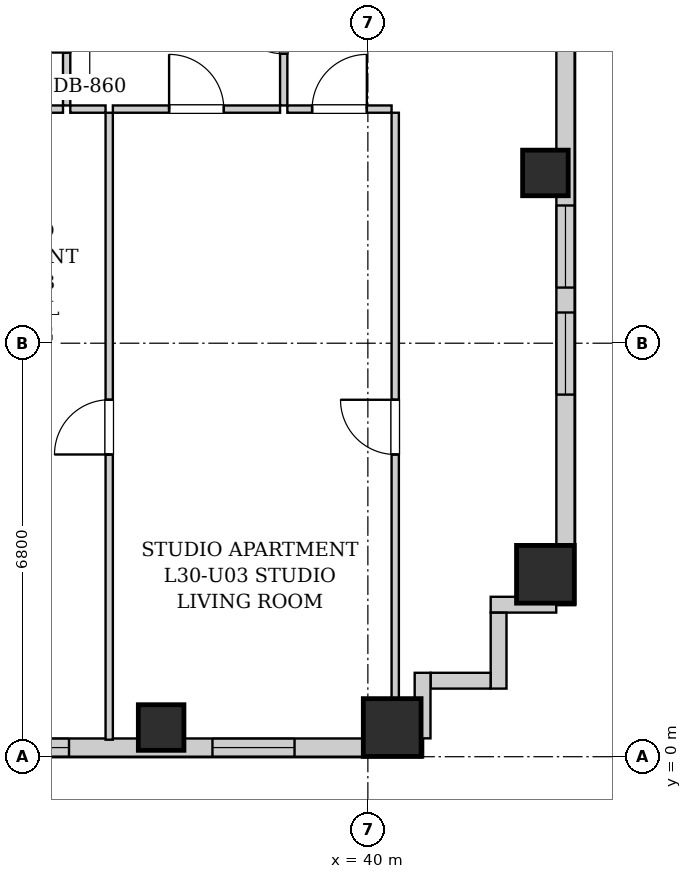
"""IFC4 building model, lengths in metres.
Left out: names, types, materials, properties, quantities, classifications, styles, units other than length and angle.
Written with IfcOpenShell. Run it as: python <this file> out.ifc"""

import sys

from ifc_helpers import new_model, si_unit, direction, frame, frame_2d, origin, origin_2d, place, context, subcontext, project, spatial, rectangle, extrude, element, fill, save


model = new_model("IFC4")
c1 = context("Model", 3, precision=1e-05, world=origin(), true_north=direction((0.0, 1.0)))
c2 = subcontext(c1, "Body", "Model", "MODEL_VIEW")
j1 = project(units=[si_unit("LENGTHUNIT", "METRE"), si_unit("PLANEANGLEUNIT", "RADIAN")], contexts=[c1])
p1 = place(None, origin())
s1 = spatial("IfcSite", under=j1, at=p1, CompositionType="ELEMENT")
p2 = place(p1, origin())
s2 = spatial("IfcBuilding", under=s1, at=p2, CompositionType="ELEMENT")
p3 = place(p2, frame((0.0, 0.0, 107.1)))
s3 = spatial("IfcBuildingStorey", under=s2, at=p3, CompositionType="ELEMENT", Elevation=107.1)
p4 = place(p3, frame((36.6, 0.48, 0.0), z_axis=(0.0, 0.0, 1.0), x_axis=(1.0, 0.0, 0.0)))
e1 = element("IfcColumn", 1, at=p4, inside=s3, PredefinedType="COLUMN", context=c2, shape_type="SweptSolid", body=[
    extrude(rectangle(XDim=0.75, YDim=0.75, at=origin_2d()), origin(), (0.0, 0.0, 1.0), 3.2),
])
for number, where, z_axis, x_axis in (
    (2, (40.4, 0.48, 0.0), (0.0, 0.0, 1.0), (1.0, 0.0, 0.0)),
    (3, (42.92, 3.0, 0.0), (0.0, 0.0, 1.0), (1.0, 0.0, 0.0)),
):
    element("IfcColumn", number, at=place(p3, frame(where, z_axis=z_axis, x_axis=x_axis)), inside=s3, PredefinedType="COLUMN", context=c2, shape_type="SweptSolid", body=[
        extrude(rectangle(XDim=0.95, YDim=0.95, at=origin_2d()), origin(), (0.0, 0.0, 1.0), 3.2),
    ])
p5 = place(p3, frame((42.92, 9.6, 0.0), z_axis=(0.0, 0.0, 1.0), x_axis=(1.0, 0.0, 0.0)))
e4 = element("IfcColumn", 4, at=p5, inside=s3, PredefinedType="COLUMN", context=c2, shape_type="SweptSolid", body=[
    extrude(rectangle(XDim=0.75, YDim=0.75, at=origin_2d()), origin(), (0.0, 0.0, 1.0), 3.2),
])
p6 = place(p3, frame((43.25, 40.8, 0.0), z_axis=(0.0, 0.0, 1.0), x_axis=(0.0, -1.0, 0.0)))
e5 = element("IfcWall", 5, at=p6, inside=s3, PredefinedType="SOLIDWALL", context=c2, shape_type="SweptSolid", body=[
    extrude(rectangle(XDim=38.3, YDim=0.3, at=frame_2d((19.15, 0.0))), origin(), (0.0, 0.0, 1.0), 2.94),
])
p7 = place(p6, frame((33.495, 0.0, 0.55)))
e6 = element("IfcOpeningElement", 6, at=p7, cuts=e5, PredefinedType="OPENING", context=c2, shape_type="SweptSolid", body=[
    extrude(rectangle(XDim=1.35, YDim=1.2, at=frame_2d((0.675, 0.6))), frame((0.0, 0.16, 0.0), z_axis=(0.0, -1.0, 0.0), x_axis=(1.0, 0.0, 0.0)), (0.0, 0.0, 1.0), 0.32),
])
p8 = place(p6, frame((31.735, 0.0, 0.55)))
e7 = element("IfcOpeningElement", 7, at=p8, cuts=e5, PredefinedType="OPENING", context=c2, shape_type="SweptSolid", body=[
    extrude(rectangle(XDim=1.35, YDim=1.2, at=frame_2d((0.675, 0.6))), frame((0.0, 0.16, 0.0), z_axis=(0.0, -1.0, 0.0), x_axis=(1.0, 0.0, 0.0)), (0.0, 0.0, 1.0), 0.32),
])
p9 = place(p6, frame((21.93, 0.0, 0.55)))
e8 = element("IfcOpeningElement", 8, at=p9, cuts=e5, PredefinedType="OPENING", context=c2, shape_type="SweptSolid", body=[
    extrude(rectangle(XDim=1.35, YDim=1.2, at=frame_2d((0.675, 0.6))), frame((0.0, 0.16, 0.0), z_axis=(0.0, -1.0, 0.0), x_axis=(1.0, 0.0, 0.0)), (0.0, 0.0, 1.0), 0.32),
])
p10 = place(p6, frame((23.54, 0.0, 0.55)))
e9 = element("IfcOpeningElement", 9, at=p10, cuts=e5, PredefinedType="OPENING", context=c2, shape_type="SweptSolid", body=[
    extrude(rectangle(XDim=1.35, YDim=1.2, at=frame_2d((0.675, 0.6))), frame((0.0, 0.16, 0.0), z_axis=(0.0, -1.0, 0.0), x_axis=(1.0, 0.0, 0.0)), (0.0, 0.0, 1.0), 0.32),
])
p11 = place(p6, frame((14.95, 0.0, 0.55)))
e10 = element("IfcOpeningElement", 10, at=p11, cuts=e5, PredefinedType="OPENING", context=c2, shape_type="SweptSolid", body=[
    extrude(rectangle(XDim=1.35, YDim=1.2, at=frame_2d((0.675, 0.6))), frame((0.0, 0.16, 0.0), z_axis=(0.0, -1.0, 0.0), x_axis=(1.0, 0.0, 0.0)), (0.0, 0.0, 1.0), 0.32),
])
p12 = place(p6, frame((12.335, 0.0, 0.55)))
e11 = element("IfcOpeningElement", 11, at=p12, cuts=e5, PredefinedType="OPENING", context=c2, shape_type="SweptSolid", body=[
    extrude(rectangle(XDim=1.35, YDim=1.2, at=frame_2d((0.675, 0.6))), frame((0.0, 0.16, 0.0), z_axis=(0.0, -1.0, 0.0), x_axis=(1.0, 0.0, 0.0)), (0.0, 0.0, 1.0), 0.32),
])
p13 = place(p3, frame((40.9, 0.15, 0.0), z_axis=(0.0, 0.0, 1.0), x_axis=(-1.0, 0.0, 0.0)))
e12 = element("IfcWall", 12, at=p13, inside=s3, PredefinedType="SOLIDWALL", context=c2, shape_type="SweptSolid", body=[
    extrude(rectangle(XDim=23.15, YDim=0.3, at=frame_2d((11.575, 0.0))), origin(), (0.0, 0.0, 1.0), 2.94),
])
p14 = place(p13, frame((20.296, 0.0, 0.55)))
e13 = element("IfcOpeningElement", 13, at=p14, cuts=e12, PredefinedType="OPENING", context=c2, shape_type="SweptSolid", body=[
    extrude(rectangle(XDim=1.35, YDim=1.2, at=frame_2d((0.675, 0.6))), frame((0.0, 0.16, 0.0), z_axis=(0.0, -1.0, 0.0), x_axis=(1.0, 0.0, 0.0)), (0.0, 0.0, 1.0), 0.32),
])
p15 = place(p13, frame((12.55, 0.0, 0.55)))
e14 = element("IfcOpeningElement", 14, at=p15, cuts=e12, PredefinedType="OPENING", context=c2, shape_type="SweptSolid", body=[
    extrude(rectangle(XDim=0.85, YDim=1.2, at=frame_2d((0.425, 0.6))), frame((0.0, 0.16, 0.0), z_axis=(0.0, -1.0, 0.0), x_axis=(1.0, 0.0, 0.0)), (0.0, 0.0, 1.0), 0.32),
])
p16 = place(p13, frame((9.622, 0.0, 0.55)))
e15 = element("IfcOpeningElement", 15, at=p16, cuts=e12, PredefinedType="OPENING", context=c2, shape_type="SweptSolid", body=[
    extrude(rectangle(XDim=1.35, YDim=1.2, at=frame_2d((0.675, 0.6))), frame((0.0, 0.16, 0.0), z_axis=(0.0, -1.0, 0.0), x_axis=(1.0, 0.0, 0.0)), (0.0, 0.0, 1.0), 0.32),
])
p17 = place(p13, frame((5.815, 0.0, 0.55)))
e16 = element("IfcOpeningElement", 16, at=p17, cuts=e12, PredefinedType="OPENING", context=c2, shape_type="SweptSolid", body=[
    extrude(rectangle(XDim=1.35, YDim=1.2, at=frame_2d((0.675, 0.6))), frame((0.0, 0.16, 0.0), z_axis=(0.0, -1.0, 0.0), x_axis=(1.0, 0.0, 0.0)), (0.0, 0.0, 1.0), 0.32),
])
p18 = place(p13, frame((2.106, 0.0, 0.55)))
e17 = element("IfcOpeningElement", 17, at=p18, cuts=e12, PredefinedType="OPENING", context=c2, shape_type="SweptSolid", body=[
    extrude(rectangle(XDim=1.35, YDim=1.2, at=frame_2d((0.675, 0.6))), frame((0.0, 0.16, 0.0), z_axis=(0.0, -1.0, 0.0), x_axis=(1.0, 0.0, 0.0)), (0.0, 0.0, 1.0), 0.32),
])
p19 = place(p3, frame((43.098, 2.5, 0.0), z_axis=(0.0, 0.0, 1.0), x_axis=(-1.0, 0.0, 0.0)))
e18 = element("IfcWall", 18, at=p19, inside=s3, PredefinedType="SOLIDWALL", context=c2, shape_type="SweptSolid", body=[
    extrude(rectangle(XDim=1.078, YDim=0.26, at=frame_2d((0.539, 0.0))), origin(), (0.0, 0.0, 1.0), 2.94),
])
p20 = place(p3, frame((42.15, 2.368, 0.0), z_axis=(0.0, 0.0, 1.0), x_axis=(0.0, -1.0, 0.0)))
e19 = element("IfcWall", 19, at=p20, inside=s3, PredefinedType="SOLIDWALL", context=c2, shape_type="SweptSolid", body=[
    extrude(rectangle(XDim=1.248, YDim=0.26, at=frame_2d((0.624, 0.0))), origin(), (0.0, 0.0, 1.0), 2.94),
])
p21 = place(p3, frame((42.018, 1.25, 0.0), z_axis=(0.0, 0.0, 1.0), x_axis=(-1.0, 0.0, 0.0)))
e20 = element("IfcWall", 20, at=p21, inside=s3, PredefinedType="SOLIDWALL", context=c2, shape_type="SweptSolid", body=[
    extrude(rectangle(XDim=0.986, YDim=0.26, at=frame_2d((0.493, 0.0))), origin(), (0.0, 0.0, 1.0), 2.94),
])
p22 = place(p3, frame((40.9, 1.38, 0.0), z_axis=(0.0, 0.0, 1.0), x_axis=(0.0, -1.0, 0.0)))
e21 = element("IfcWall", 21, at=p22, inside=s3, PredefinedType="SOLIDWALL", context=c2, shape_type="SweptSolid", body=[
    extrude(rectangle(XDim=1.078, YDim=0.26, at=frame_2d((0.539, 0.0))), origin(), (0.0, 0.0, 1.0), 2.94),
])
p23 = place(p3, frame((35.046, 10.71, 0.0), z_axis=(0.0, 0.0, 1.0), x_axis=(0.0, 1.0, 0.0)))
e22 = element("IfcWall", 22, at=p23, inside=s3, PredefinedType="PARTITIONING", context=c2, shape_type="SweptSolid", body=[
    extrude(rectangle(XDim=2.6, YDim=0.12, at=frame_2d((1.3, 0.0))), origin(), (0.0, 0.0, 1.0), 2.94),
])
p24 = place(p23, frame((0.87, 0.0, 0.0)))
e23 = element("IfcOpeningElement", 23, at=p24, cuts=e22, PredefinedType="OPENING", context=c2, shape_type="SweptSolid", body=[
    extrude(rectangle(XDim=0.86, YDim=2.05, at=frame_2d((0.43, 1.025))), frame((0.0, 0.07, 0.0), z_axis=(0.0, -1.0, 0.0), x_axis=(1.0, 0.0, 0.0)), (0.0, 0.0, 1.0), 0.14),
])
p25 = place(p3, frame((32.586, 10.65, 0.0), z_axis=(0.0, 0.0, 1.0), x_axis=(1.0, 0.0, 0.0)))
e24 = element("IfcWall", 24, at=p25, inside=s3, PredefinedType="PARTITIONING", context=c2, shape_type="SweptSolid", body=[
    extrude(rectangle(XDim=2.4, YDim=0.12, at=frame_2d((1.2, 0.0))), origin(), (0.0, 0.0, 1.0), 2.94),
])
p26 = place(p3, frame((38.616, 10.71, 0.0), z_axis=(0.0, 0.0, 1.0), x_axis=(0.0, 1.0, 0.0)))
e25 = element("IfcWall", 25, at=p26, inside=s3, PredefinedType="PARTITIONING", context=c2, shape_type="SweptSolid", body=[
    extrude(rectangle(XDim=2.6, YDim=0.12, at=frame_2d((1.3, 0.0))), origin(), (0.0, 0.0, 1.0), 2.94),
])
p27 = place(p26, frame((0.85, 0.0, 0.0)))
e26 = element("IfcOpeningElement", 26, at=p27, cuts=e25, PredefinedType="OPENING", context=c2, shape_type="SweptSolid", body=[
    extrude(rectangle(XDim=0.9, YDim=2.05, at=frame_2d((0.45, 1.025))), frame((0.0, 0.07, 0.0), z_axis=(0.0, -1.0, 0.0), x_axis=(1.0, 0.0, 0.0)), (0.0, 0.0, 1.0), 0.14),
])
p28 = place(p3, frame((35.106, 10.65, 0.0), z_axis=(0.0, 0.0, 1.0), x_axis=(1.0, 0.0, 0.0)))
e27 = element("IfcWall", 27, at=p28, inside=s3, PredefinedType="PARTITIONING", context=c2, shape_type="SweptSolid", body=[
    extrude(rectangle(XDim=0.58, YDim=0.12, at=frame_2d((0.29, 0.0))), origin(), (0.0, 0.0, 1.0), 2.94),
])
p29 = place(p3, frame((35.806, 10.65, 0.0), z_axis=(0.0, 0.0, 1.0), x_axis=(1.0, 0.0, 0.0)))
e28 = element("IfcWall", 28, at=p29, inside=s3, PredefinedType="PARTITIONING", context=c2, shape_type="SweptSolid", body=[
    extrude(rectangle(XDim=2.75, YDim=0.12, at=frame_2d((1.375, 0.0))), origin(), (0.0, 0.0, 1.0), 2.94),
])
p30 = place(p29, frame((0.925, 0.0, 0.0)))
e29 = element("IfcOpeningElement", 29, at=p30, cuts=e28, PredefinedType="OPENING", context=c2, shape_type="SweptSolid", body=[
    extrude(rectangle(XDim=0.9, YDim=2.05, at=frame_2d((0.45, 1.025))), frame((0.0, 0.07, 0.0), z_axis=(0.0, -1.0, 0.0), x_axis=(1.0, 0.0, 0.0)), (0.0, 0.0, 1.0), 0.14),
])
p31 = place(p3, frame((38.676, 10.65, 0.0), z_axis=(0.0, 0.0, 1.0), x_axis=(1.0, 0.0, 0.0)))
e30 = element("IfcWall", 30, at=p31, inside=s3, PredefinedType="PARTITIONING", context=c2, shape_type="SweptSolid", body=[
    extrude(rectangle(XDim=1.714, YDim=0.12, at=frame_2d((0.857, 0.0))), origin(), (0.0, 0.0, 1.0), 2.94),
])
p32 = place(p31, frame((0.407, 0.0, 0.0)))
e31 = element("IfcOpeningElement", 31, at=p32, cuts=e30, PredefinedType="OPENING", context=c2, shape_type="SweptSolid", body=[
    extrude(rectangle(XDim=0.9, YDim=2.05, at=frame_2d((0.45, 1.025))), frame((0.0, 0.07, 0.0), z_axis=(0.0, -1.0, 0.0), x_axis=(1.0, 0.0, 0.0)), (0.0, 0.0, 1.0), 0.14),
])
p33 = place(p3, frame((35.746, 0.28, 0.0), z_axis=(0.0, 0.0, 1.0), x_axis=(0.0, 1.0, 0.0)))
e32 = element("IfcWall", 32, at=p33, inside=s3, PredefinedType="PARTITIONING", context=c2, shape_type="SweptSolid", body=[
    extrude(rectangle(XDim=10.31, YDim=0.12, at=frame_2d((5.155, 0.0))), origin(), (0.0, 0.0, 1.0), 2.94),
])
p34 = place(p33, frame((4.69, 0.0, 0.0)))
e33 = element("IfcOpeningElement", 33, at=p34, cuts=e32, PredefinedType="OPENING", context=c2, shape_type="SweptSolid", body=[
    extrude(rectangle(XDim=0.9, YDim=2.05, at=frame_2d((0.45, 1.025))), frame((0.0, 0.07, 0.0), z_axis=(0.0, -1.0, 0.0), x_axis=(1.0, 0.0, 0.0)), (0.0, 0.0, 1.0), 0.14),
])
p35 = place(p3, frame((40.45, 0.28, 0.0), z_axis=(0.0, 0.0, 1.0), x_axis=(0.0, 1.0, 0.0)))
e34 = element("IfcWall", 34, at=p35, inside=s3, PredefinedType="PARTITIONING", context=c2, shape_type="SweptSolid", body=[
    extrude(rectangle(XDim=10.31, YDim=0.12, at=frame_2d((5.155, 0.0))), origin(), (0.0, 0.0, 1.0), 2.94),
])
p36 = place(p35, frame((4.69, 0.0, 0.0)))
e35 = element("IfcOpeningElement", 35, at=p36, cuts=e34, PredefinedType="OPENING", context=c2, shape_type="SweptSolid", body=[
    extrude(rectangle(XDim=0.9, YDim=2.05, at=frame_2d((0.45, 1.025))), frame((0.0, 0.07, 0.0), z_axis=(0.0, -1.0, 0.0), x_axis=(1.0, 0.0, 0.0)), (0.0, 0.0, 1.0), 0.14),
])
p37 = place(p24, origin())
e36 = element("IfcDoor", 36, at=p37, inside=s3, OperationType="SINGLE_SWING_LEFT", PredefinedType="DOOR", context=c2, shape_type="SweptSolid", body=[
    extrude(rectangle(XDim=0.86, YDim=2.05, at=frame_2d((0.43, 1.025))), frame((0.0, 0.025, 0.0), z_axis=(0.0, -1.0, 0.0), x_axis=(1.0, 0.0, 0.0)), (0.0, 0.0, 1.0), 0.05),
])
fill(e23, e36)
p38 = place(p27, origin())
e37 = element("IfcDoor", 37, at=p38, inside=s3, OperationType="SINGLE_SWING_RIGHT", PredefinedType="DOOR", context=c2, shape_type="SweptSolid", body=[
    extrude(rectangle(XDim=0.9, YDim=2.05, at=frame_2d((0.45, 1.025))), frame((0.0, 0.025, 0.0), z_axis=(0.0, -1.0, 0.0), x_axis=(1.0, 0.0, 0.0)), (0.0, 0.0, 1.0), 0.05),
])
fill(e26, e37)
p39 = place(p30, origin())
e38 = element("IfcDoor", 38, at=p39, inside=s3, OperationType="SINGLE_SWING_LEFT", PredefinedType="DOOR", context=c2, shape_type="SweptSolid", body=[
    extrude(rectangle(XDim=0.9, YDim=2.05, at=frame_2d((0.45, 1.025))), frame((0.0, 0.025, 0.0), z_axis=(0.0, -1.0, 0.0), x_axis=(1.0, 0.0, 0.0)), (0.0, 0.0, 1.0), 0.05),
])
fill(e29, e38)
p40 = place(p32, origin())
e39 = element("IfcDoor", 39, at=p40, inside=s3, OperationType="SINGLE_SWING_RIGHT", PredefinedType="DOOR", context=c2, shape_type="SweptSolid", body=[
    extrude(rectangle(XDim=0.9, YDim=2.05, at=frame_2d((0.45, 1.025))), frame((0.0, 0.025, 0.0), z_axis=(0.0, -1.0, 0.0), x_axis=(1.0, 0.0, 0.0)), (0.0, 0.0, 1.0), 0.05),
])
fill(e31, e39)
p41 = place(p34, origin())
e40 = element("IfcDoor", 40, at=p41, inside=s3, OperationType="SINGLE_SWING_LEFT", PredefinedType="DOOR", context=c2, shape_type="SweptSolid", body=[
    extrude(rectangle(XDim=0.9, YDim=2.05, at=frame_2d((0.45, 1.025))), frame((0.0, 0.025, 0.0), z_axis=(0.0, -1.0, 0.0), x_axis=(1.0, 0.0, 0.0)), (0.0, 0.0, 1.0), 0.05),
])
fill(e33, e40)
p42 = place(p36, origin())
e41 = element("IfcDoor", 41, at=p42, inside=s3, OperationType="SINGLE_SWING_RIGHT", PredefinedType="DOOR", context=c2, shape_type="SweptSolid", body=[
    extrude(rectangle(XDim=0.9, YDim=2.05, at=frame_2d((0.45, 1.025))), frame((0.0, 0.025, 0.0), z_axis=(0.0, -1.0, 0.0), x_axis=(1.0, 0.0, 0.0)), (0.0, 0.0, 1.0), 0.05),
])
fill(e35, e41)
p43 = place(p17, origin())
e42 = element("IfcWindow", 42, at=p43, inside=s3, PartitioningType="SINGLE_PANEL", PredefinedType="WINDOW", context=c2, shape_type="SweptSolid", body=[
    extrude(rectangle(XDim=1.35, YDim=1.2, at=frame_2d((0.675, 0.6))), frame((0.0, 0.03, 0.0), z_axis=(0.0, -1.0, 0.0), x_axis=(1.0, 0.0, 0.0)), (0.0, 0.0, 1.0), 0.06),
])
fill(e16, e42)
p44 = place(p18, origin())
e43 = element("IfcWindow", 43, at=p44, inside=s3, PartitioningType="SINGLE_PANEL", PredefinedType="WINDOW", context=c2, shape_type="SweptSolid", body=[
    extrude(rectangle(XDim=1.35, YDim=1.2, at=frame_2d((0.675, 0.6))), frame((0.0, 0.03, 0.0), z_axis=(0.0, -1.0, 0.0), x_axis=(1.0, 0.0, 0.0)), (0.0, 0.0, 1.0), 0.06),
])
fill(e17, e43)
p45 = place(p7, origin())
e44 = element("IfcWindow", 44, at=p45, inside=s3, PartitioningType="SINGLE_PANEL", PredefinedType="WINDOW", context=c2, shape_type="SweptSolid", body=[
    extrude(rectangle(XDim=1.35, YDim=1.2, at=frame_2d((0.675, 0.6))), frame((0.0, 0.03, 0.0), z_axis=(0.0, -1.0, 0.0), x_axis=(1.0, 0.0, 0.0)), (0.0, 0.0, 1.0), 0.06),
])
fill(e6, e44)
p46 = place(p8, origin())
e45 = element("IfcWindow", 45, at=p46, inside=s3, PartitioningType="SINGLE_PANEL", PredefinedType="WINDOW", context=c2, shape_type="SweptSolid", body=[
    extrude(rectangle(XDim=1.35, YDim=1.2, at=frame_2d((0.675, 0.6))), frame((0.0, 0.03, 0.0), z_axis=(0.0, -1.0, 0.0), x_axis=(1.0, 0.0, 0.0)), (0.0, 0.0, 1.0), 0.06),
])
fill(e7, e45)
save(model, sys.argv[1])
